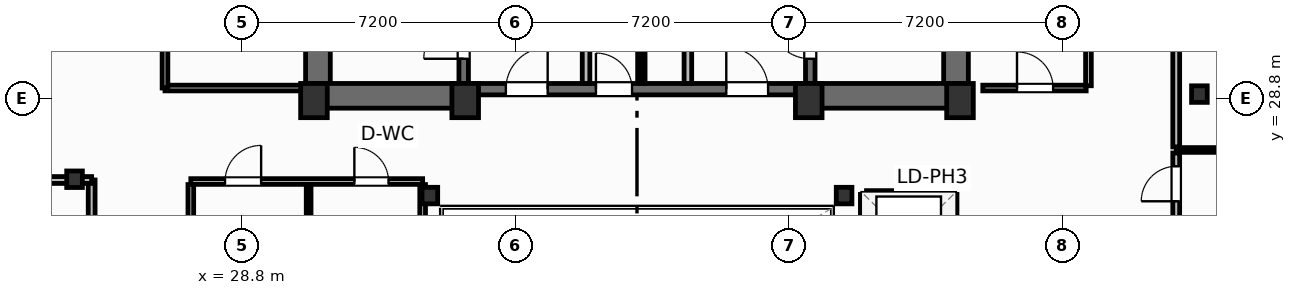
"""IFC4 building model, lengths in metres.
Left out: names, types, materials, properties, quantities, classifications, styles, units other than length and angle.
Written with IfcOpenShell. Run it as: python <this file> out.ifc"""

import sys

from ifc_helpers import new_model, si_unit, direction, frame, frame_2d, origin, origin_2d, place, context, subcontext, project, spatial, rectangle, i_section, extrude, element, fill, save


model = new_model("IFC4")
c1 = context("Model", 3, precision=1e-05, world=origin(), true_north=direction((0.0, 1.0)))
c2 = subcontext(c1, "Body", "Model", "MODEL_VIEW")
j1 = project(units=[si_unit("LENGTHUNIT", "METRE"), si_unit("PLANEANGLEUNIT", "RADIAN")], contexts=[c1])
p1 = place(None, origin())
s1 = spatial("IfcSite", under=j1, at=p1, CompositionType="ELEMENT")
p2 = place(p1, origin())
s2 = spatial("IfcBuilding", under=s1, at=p2, CompositionType="ELEMENT")
p3 = place(p2, frame((0.0, 0.0, 231.2)))
s3 = spatial("IfcBuildingStorey", under=s2, at=p3, CompositionType="ELEMENT", Elevation=231.2)
for number, where, z_axis, x_axis in (
    (1, (30.7, 28.75, 0.0), (0.0, 0.0, 1.0), (1.0, 0.0, 0.0)),
    (2, (34.68, 28.75, 0.0), (0.0, 0.0, 1.0), (1.0, 0.0, 0.0)),
    (3, (43.72, 28.75, 0.0), (0.0, 0.0, 1.0), (1.0, 0.0, 0.0)),
    (4, (47.7, 28.75, 0.0), (0.0, 0.0, 1.0), (1.0, 0.0, 0.0)),
):
    element("IfcColumn", number, at=place(p3, frame(where, z_axis=z_axis, x_axis=x_axis)), inside=s3, PredefinedType="COLUMN", context=c2, shape_type="SweptSolid", body=[
        extrude(rectangle(XDim=0.7, YDim=0.9, at=origin_2d()), origin(), (0.0, 0.0, 1.0), 3.7),
    ])
for number, where, z_axis, x_axis in (
    (5, (33.75, 26.25, 0.0), (0.0, 0.0, 1.0), (1.0, 0.0, 0.0)),
    (6, (44.65, 26.25, 0.0), (0.0, 0.0, 1.0), (1.0, 0.0, 0.0)),
    (7, (24.4, 26.68, 0.0), (0.0, 0.0, 1.0), (1.0, 0.0, 0.0)),
    (8, (54.0, 28.92, 0.0), (0.0, 0.0, 1.0), (1.0, 0.0, 0.0)),
):
    element("IfcColumn", number, at=place(p3, frame(where, z_axis=z_axis, x_axis=x_axis)), inside=s3, PredefinedType="COLUMN", context=c2, shape_type="SweptSolid", body=[
        extrude(i_section(OverallWidth=0.412, OverallDepth=0.435, WebThickness=0.036, FlangeThickness=0.057, FilletRadius=0.025, at=origin_2d()), origin(), (0.0, 0.0, 1.0), 3.7),
    ])
for number, where, z_axis, x_axis in (
    (9, (30.805, 29.2, 0.0), (0.0, 0.0, 1.0), (0.0, 1.0, 0.0)),
    (10, (47.595, 29.2, 0.0), (0.0, 0.0, 1.0), (0.0, 1.0, 0.0)),
):
    element("IfcWall", number, at=place(p3, frame(where, z_axis=z_axis, x_axis=x_axis)), inside=s3, PredefinedType="SHEAR", context=c2, shape_type="SweptSolid", body=[
        extrude(rectangle(XDim=9.22, YDim=0.65, at=frame_2d((4.61, 0.0))), origin(), (0.0, 0.0, 1.0), 3.45),
    ])
p4 = place(p3, frame((30.48, 28.875, 0.0), z_axis=(0.0, 0.0, 1.0), x_axis=(1.0, 0.0, 0.0)))
e11 = element("IfcWall", 11, at=p4, inside=s3, PredefinedType="SHEAR", context=c2, shape_type="SweptSolid", body=[
    extrude(rectangle(XDim=4.32, YDim=0.65, at=frame_2d((2.16, 0.0))), origin(), (0.0, 0.0, 1.0), 3.45),
])
p5 = place(p3, frame((43.6, 28.875, 0.0), z_axis=(0.0, 0.0, 1.0), x_axis=(1.0, 0.0, 0.0)))
e12 = element("IfcWall", 12, at=p5, inside=s3, PredefinedType="SHEAR", context=c2, shape_type="SweptSolid", body=[
    extrude(rectangle(XDim=4.32, YDim=0.65, at=frame_2d((2.16, 0.0))), origin(), (0.0, 0.0, 1.0), 3.45),
])
p6 = place(p3, frame((34.8, 29.05, 0.0), z_axis=(0.0, 0.0, 1.0), x_axis=(1.0, 0.0, 0.0)))
e13 = element("IfcWall", 13, at=p6, inside=s3, PredefinedType="SHEAR", context=c2, shape_type="SweptSolid", body=[
    extrude(rectangle(XDim=8.8, YDim=0.3, at=frame_2d((4.4, 0.0))), origin(), (0.0, 0.0, 1.0), 3.45),
])
p7 = place(p6, frame((0.95, 0.0, 0.0)))
e14 = element("IfcOpeningElement", 14, at=p7, cuts=e13, PredefinedType="OPENING", context=c2, shape_type="SweptSolid", body=[
    extrude(rectangle(XDim=1.1, YDim=2.15, at=frame_2d((0.55, 1.075))), frame((0.0, 0.16, 0.0), z_axis=(0.0, -1.0, 0.0), x_axis=(1.0, 0.0, 0.0)), (0.0, 0.0, 1.0), 0.32),
])
p8 = place(p6, frame((6.75, 0.0, 0.0)))
e15 = element("IfcOpeningElement", 15, at=p8, cuts=e13, PredefinedType="OPENING", context=c2, shape_type="SweptSolid", body=[
    extrude(rectangle(XDim=1.1, YDim=2.15, at=frame_2d((0.55, 1.075))), frame((0.0, 0.16, 0.0), z_axis=(0.0, -1.0, 0.0), x_axis=(1.0, 0.0, 0.0)), (0.0, 0.0, 1.0), 0.32),
])
p9 = place(p6, frame((3.32, 0.0, 0.0)))
e16 = element("IfcOpeningElement", 16, at=p9, cuts=e13, PredefinedType="OPENING", context=c2, shape_type="SweptSolid", body=[
    extrude(rectangle(XDim=0.95, YDim=2.15, at=frame_2d((0.475, 1.075))), frame((0.0, 0.16, 0.0), z_axis=(0.0, -1.0, 0.0), x_axis=(1.0, 0.0, 0.0)), (0.0, 0.0, 1.0), 0.32),
])
p10 = place(p3, frame((34.64, 29.2, 0.0), z_axis=(0.0, 0.0, 1.0), x_axis=(0.0, 1.0, 0.0)))
e17 = element("IfcWall", 17, at=p10, inside=s3, PredefinedType="SHEAR", context=c2, shape_type="SweptSolid", body=[
    extrude(rectangle(XDim=9.22, YDim=0.25, at=frame_2d((4.61, 0.0))), origin(), (0.0, 0.0, 1.0), 3.45),
])
p11 = place(p10, frame((0.65, 0.0, 0.0)))
e18 = element("IfcOpeningElement", 18, at=p11, cuts=e17, PredefinedType="OPENING", context=c2, shape_type="SweptSolid", body=[
    extrude(rectangle(XDim=1.05, YDim=2.15, at=frame_2d((0.525, 1.075))), frame((0.0, 0.135, 0.0), z_axis=(0.0, -1.0, 0.0), x_axis=(1.0, 0.0, 0.0)), (0.0, 0.0, 1.0), 0.27),
])
p12 = place(p3, frame((43.76, 29.2, 0.0), z_axis=(0.0, 0.0, 1.0), x_axis=(0.0, 1.0, 0.0)))
e19 = element("IfcWall", 19, at=p12, inside=s3, PredefinedType="SHEAR", context=c2, shape_type="SweptSolid", body=[
    extrude(rectangle(XDim=9.22, YDim=0.25, at=frame_2d((4.61, 0.0))), origin(), (0.0, 0.0, 1.0), 3.45),
])
p13 = place(p12, frame((0.65, 0.0, 0.0)))
e20 = element("IfcOpeningElement", 20, at=p13, cuts=e19, PredefinedType="OPENING", context=c2, shape_type="SweptSolid", body=[
    extrude(rectangle(XDim=1.05, YDim=2.15, at=frame_2d((0.525, 1.075))), frame((0.0, 0.135, 0.0), z_axis=(0.0, -1.0, 0.0), x_axis=(1.0, 0.0, 0.0)), (0.0, 0.0, 1.0), 0.27),
])
p14 = place(p3, frame((24.85, 19.24, 0.0), z_axis=(0.0, 0.0, 1.0), x_axis=(0.0, 1.0, 0.0)))
e21 = element("IfcWall", 21, at=p14, inside=s3, PredefinedType="PARTITIONING", context=c2, shape_type="SweptSolid", body=[
    extrude(rectangle(XDim=7.42, YDim=0.18, at=frame_2d((3.71, 0.0))), origin(), (0.0, 0.0, 1.0), 3.45),
])
p15 = place(p14, frame((2.4, 0.0, 0.0)))
e22 = element("IfcOpeningElement", 22, at=p15, cuts=e21, PredefinedType="OPENING", context=c2, shape_type="SweptSolid", body=[
    extrude(rectangle(XDim=0.92, YDim=2.05, at=frame_2d((0.46, 1.025))), frame((0.0, 0.1, 0.0), z_axis=(0.0, -1.0, 0.0), x_axis=(1.0, 0.0, 0.0)), (0.0, 0.0, 1.0), 0.2),
])
p16 = place(p3, frame((3.482, 26.66, 0.0), z_axis=(0.0, 0.0, 1.0), x_axis=(1.0, 0.0, 0.0)))
e23 = element("IfcWall", 23, at=p16, inside=s3, PredefinedType="PARTITIONING", context=c2, shape_type="SweptSolid", body=[
    extrude(rectangle(XDim=21.368, YDim=0.18, at=frame_2d((10.684, 0.0))), origin(), (0.0, 0.0, 1.0), 2.662),
])
p17 = place(p3, frame((53.39, 19.3, 0.0), z_axis=(0.0, 0.0, 1.0), x_axis=(0.0, 1.0, 0.0)))
e24 = element("IfcWall", 24, at=p17, inside=s3, PredefinedType="PARTITIONING", context=c2, shape_type="SweptSolid", body=[
    extrude(rectangle(XDim=8.07, YDim=0.18, at=frame_2d((4.035, 0.0))), origin(), (0.0, 0.0, 1.0), 3.45),
])
p18 = place(p17, frame((6.8, 0.0, 0.0)))
e25 = element("IfcOpeningElement", 25, at=p18, cuts=e24, PredefinedType="OPENING", context=c2, shape_type="SweptSolid", body=[
    extrude(rectangle(XDim=0.92, YDim=2.05, at=frame_2d((0.46, 1.025))), frame((0.0, 0.1, 0.0), z_axis=(0.0, -1.0, 0.0), x_axis=(1.0, 0.0, 0.0)), (0.0, 0.0, 1.0), 0.2),
])
p19 = place(p3, frame((53.39, 27.53, 0.0), z_axis=(0.0, 0.0, 1.0), x_axis=(0.0, 1.0, 0.0)))
e26 = element("IfcWall", 26, at=p19, inside=s3, PredefinedType="PARTITIONING", context=c2, shape_type="SweptSolid", body=[
    extrude(rectangle(XDim=11.67, YDim=0.18, at=frame_2d((5.835, 0.0))), origin(), (0.0, 0.0, 1.0), 3.45),
])
p20 = place(p19, frame((5.8, 0.0, 0.0)))
e27 = element("IfcOpeningElement", 27, at=p20, cuts=e26, PredefinedType="OPENING", context=c2, shape_type="SweptSolid", body=[
    extrude(rectangle(XDim=0.92, YDim=2.05, at=frame_2d((0.46, 1.025))), frame((0.0, 0.1, 0.0), z_axis=(0.0, -1.0, 0.0), x_axis=(1.0, 0.0, 0.0)), (0.0, 0.0, 1.0), 0.2),
])
p21 = place(p3, frame((53.39, 27.45, 0.0), z_axis=(0.0, 0.0, 1.0), x_axis=(1.0, 0.0, 0.0)))
e28 = element("IfcWall", 28, at=p21, inside=s3, PredefinedType="PARTITIONING", context=c2, shape_type="SweptSolid", body=[
    extrude(rectangle(XDim=20.199, YDim=0.125, at=frame_2d((10.1, 0.0))), origin(), (0.0, 0.0, 1.0), 2.739),
])
for number, where, z_axis, x_axis in (
    (29, (37.86, 29.2, 0.0), (0.0, 0.0, 1.0), (0.0, 1.0, 0.0)),
    (30, (40.54, 29.2, 0.0), (0.0, 0.0, 1.0), (0.0, 1.0, 0.0)),
):
    element("IfcWall", number, at=place(p3, frame(where, z_axis=z_axis, x_axis=x_axis)), inside=s3, PredefinedType="PARTITIONING", context=c2, shape_type="SweptSolid", body=[
        extrude(rectangle(XDim=5.18, YDim=0.2, at=frame_2d((2.59, 0.0))), origin(), (0.0, 0.0, 1.0), 3.45),
    ])
p22 = place(p3, frame((39.35, 29.2, 0.0), z_axis=(0.0, 0.0, 1.0), x_axis=(0.0, 1.0, 0.0)))
e31 = element("IfcWall", 31, at=p22, inside=s3, PredefinedType="PARTITIONING", context=c2, shape_type="SweptSolid", body=[
    extrude(rectangle(XDim=5.22, YDim=0.125, at=frame_2d((2.61, 0.0))), origin(), (0.0, 0.0, 1.0), 3.45),
])
p23 = place(p22, frame((2.05, 0.0, 0.0)))
e32 = element("IfcOpeningElement", 32, at=p23, cuts=e31, PredefinedType="OPENING", context=c2, shape_type="SweptSolid", body=[
    extrude(rectangle(XDim=0.85, YDim=2.05, at=frame_2d((0.425, 1.025))), frame((0.0, 0.073, 0.0), z_axis=(0.0, -1.0, 0.0), x_axis=(1.0, 0.0, 0.0)), (0.0, 0.0, 1.0), 0.145),
])
p24 = place(p3, frame((27.46, 26.62, 0.0), z_axis=(0.0, 0.0, 1.0), x_axis=(1.0, 0.0, 0.0)))
e33 = element("IfcWall", 33, at=p24, inside=s3, PredefinedType="PARTITIONING", context=c2, shape_type="SweptSolid", body=[
    extrude(rectangle(XDim=6.1, YDim=0.15, at=frame_2d((3.05, 0.0))), origin(), (0.0, 0.0, 1.0), 2.662),
])
p25 = place(p24, frame((0.9, 0.0, 0.0)))
e34 = element("IfcOpeningElement", 34, at=p25, cuts=e33, PredefinedType="OPENING", context=c2, shape_type="SweptSolid", body=[
    extrude(rectangle(XDim=0.95, YDim=2.05, at=frame_2d((0.475, 1.025))), frame((0.0, 0.085, 0.0), z_axis=(0.0, -1.0, 0.0), x_axis=(1.0, 0.0, 0.0)), (0.0, 0.0, 1.0), 0.17),
])
p26 = place(p24, frame((4.303, 0.0, 0.0)))
e35 = element("IfcOpeningElement", 35, at=p26, cuts=e33, PredefinedType="OPENING", context=c2, shape_type="SweptSolid", body=[
    extrude(rectangle(XDim=0.9, YDim=2.05, at=frame_2d((0.45, 1.025))), frame((0.0, 0.085, 0.0), z_axis=(0.0, -1.0, 0.0), x_axis=(1.0, 0.0, 0.0)), (0.0, 0.0, 1.0), 0.17),
])
p27 = place(p3, frame((30.56, 19.38, 0.0), z_axis=(0.0, 0.0, 1.0), x_axis=(0.0, 1.0, 0.0)))
e36 = element("IfcWall", 36, at=p27, inside=s3, PredefinedType="PARTITIONING", context=c2, shape_type="SweptSolid", body=[
    extrude(rectangle(XDim=7.16, YDim=0.125, at=frame_2d((3.58, 0.0))), origin(), (0.0, 0.0, 1.0), 3.45),
])
p28 = place(p27, frame((1.4, 0.0, 0.0)))
e37 = element("IfcOpeningElement", 37, at=p28, cuts=e36, PredefinedType="OPENING", context=c2, shape_type="SweptSolid", body=[
    extrude(rectangle(XDim=0.92, YDim=2.05, at=frame_2d((0.46, 1.025))), frame((0.0, 0.073, 0.0), z_axis=(0.0, -1.0, 0.0), x_axis=(1.0, 0.0, 0.0)), (0.0, 0.0, 1.0), 0.145),
])
p29 = place(p3, frame((27.46, 19.38, 0.0), z_axis=(0.0, 0.0, 1.0), x_axis=(0.0, 1.0, 0.0)))
e38 = element("IfcWall", 38, at=p29, inside=s3, PredefinedType="PARTITIONING", context=c2, shape_type="SweptSolid", body=[
    extrude(rectangle(XDim=7.16, YDim=0.15, at=frame_2d((3.58, 0.0))), origin(), (0.0, 0.0, 1.0), 3.45),
])
p30 = place(p3, frame((33.56, 19.38, 0.0), z_axis=(0.0, 0.0, 1.0), x_axis=(0.0, 1.0, 0.0)))
e39 = element("IfcWall", 39, at=p30, inside=s3, PredefinedType="PARTITIONING", context=c2, shape_type="SweptSolid", body=[
    extrude(rectangle(XDim=7.16, YDim=0.15, at=frame_2d((3.58, 0.0))), origin(), (0.0, 0.0, 1.0), 2.824),
])
p31 = place(p3, frame((26.78, 29.08, 0.0), z_axis=(0.0, 0.0, 1.0), x_axis=(1.0, 0.0, 0.0)))
e40 = element("IfcWall", 40, at=p31, inside=s3, PredefinedType="PARTITIONING", context=c2, shape_type="SweptSolid", body=[
    extrude(rectangle(XDim=3.7, YDim=0.15, at=frame_2d((1.85, 0.0))), origin(), (0.0, 0.0, 1.0), 3.45),
])
p32 = place(p3, frame((26.78, 29.08, 0.0), z_axis=(0.0, 0.0, 1.0), x_axis=(0.0, 1.0, 0.0)))
e41 = element("IfcWall", 41, at=p32, inside=s3, PredefinedType="PARTITIONING", context=c2, shape_type="SweptSolid", body=[
    extrude(rectangle(XDim=9.18, YDim=0.15, at=frame_2d((4.59, 0.0))), origin(), (0.0, 0.0, 1.0), 3.45),
])
p33 = place(p32, frame((2.4, 0.0, 0.0)))
e42 = element("IfcOpeningElement", 42, at=p33, cuts=e41, PredefinedType="OPENING", context=c2, shape_type="SweptSolid", body=[
    extrude(rectangle(XDim=0.95, YDim=2.05, at=frame_2d((0.475, 1.025))), frame((0.0, 0.085, 0.0), z_axis=(0.0, -1.0, 0.0), x_axis=(1.0, 0.0, 0.0)), (0.0, 0.0, 1.0), 0.17),
])
p34 = place(p3, frame((48.3, 29.08, 0.0), z_axis=(0.0, 0.0, 1.0), x_axis=(1.0, 0.0, 0.0)))
e43 = element("IfcWall", 43, at=p34, inside=s3, PredefinedType="PARTITIONING", context=c2, shape_type="SweptSolid", body=[
    extrude(rectangle(XDim=2.72, YDim=0.15, at=frame_2d((1.36, 0.0))), origin(), (0.0, 0.0, 1.0), 2.662),
])
p35 = place(p34, frame((0.9, 0.0, 0.0)))
e44 = element("IfcOpeningElement", 44, at=p35, cuts=e43, PredefinedType="OPENING", context=c2, shape_type="SweptSolid", body=[
    extrude(rectangle(XDim=0.95, YDim=2.05, at=frame_2d((0.475, 1.025))), frame((0.0, 0.085, 0.0), z_axis=(0.0, -1.0, 0.0), x_axis=(1.0, 0.0, 0.0)), (0.0, 0.0, 1.0), 0.17),
])
p36 = place(p3, frame((51.08, 29.14, 0.0), z_axis=(0.0, 0.0, 1.0), x_axis=(0.0, 1.0, 0.0)))
e45 = element("IfcWall", 45, at=p36, inside=s3, PredefinedType="PARTITIONING", context=c2, shape_type="SweptSolid", body=[
    extrude(rectangle(XDim=6.76, YDim=0.15, at=frame_2d((3.38, 0.0))), origin(), (0.0, 0.0, 1.0), 3.45),
])
p37 = place(p3, frame((45.24, 26.28, 0.0), z_axis=(0.0, 0.0, 1.0), x_axis=(1.0, 0.0, 0.0)))
e46 = element("IfcWall", 46, at=p37, inside=s3, PredefinedType="PARTITIONING", context=c2, shape_type="SweptSolid", body=[
    extrude(rectangle(XDim=2.22, YDim=0.2, at=frame_2d((1.11, 0.0))), origin(), (0.0, 0.0, 1.0), 3.45),
])
p38 = place(p3, frame((45.18, 19.38, 0.0), z_axis=(0.0, 0.0, 1.0), x_axis=(0.0, 1.0, 0.0)))
e47 = element("IfcWall", 47, at=p38, inside=s3, PredefinedType="PARTITIONING", context=c2, shape_type="SweptSolid", body=[
    extrude(rectangle(XDim=6.9, YDim=0.2, at=frame_2d((3.45, 0.0))), origin(), (0.0, 0.0, 1.0), 3.45),
])
p39 = place(p3, frame((47.52, 19.38, 0.0), z_axis=(0.0, 0.0, 1.0), x_axis=(0.0, 1.0, 0.0)))
e48 = element("IfcWall", 48, at=p39, inside=s3, PredefinedType="PARTITIONING", context=c2, shape_type="SweptSolid", body=[
    extrude(rectangle(XDim=6.9, YDim=0.2, at=frame_2d((3.45, 0.0))), origin(), (0.0, 0.0, 1.0), 3.45),
])
p40 = place(p39, frame((0.59, 0.0, 0.0)))
e49 = element("IfcOpeningElement", 49, at=p40, cuts=e48, PredefinedType="OPENING", context=c2, shape_type="SweptSolid", body=[
    extrude(rectangle(XDim=1.1, YDim=2.15, at=frame_2d((0.55, 1.075))), frame((0.0, 0.11, 0.0), z_axis=(0.0, -1.0, 0.0), x_axis=(1.0, 0.0, 0.0)), (0.0, 0.0, 1.0), 0.22),
])
p41 = place(p39, frame((2.89, 0.0, 0.0)))
e50 = element("IfcOpeningElement", 50, at=p41, cuts=e48, PredefinedType="OPENING", context=c2, shape_type="SweptSolid", body=[
    extrude(rectangle(XDim=1.1, YDim=2.15, at=frame_2d((0.55, 1.075))), frame((0.0, 0.11, 0.0), z_axis=(0.0, -1.0, 0.0), x_axis=(1.0, 0.0, 0.0)), (0.0, 0.0, 1.0), 0.22),
])
p42 = place(p39, frame((5.19, 0.0, 0.0)))
e51 = element("IfcOpeningElement", 51, at=p42, cuts=e48, PredefinedType="OPENING", context=c2, shape_type="SweptSolid", body=[
    extrude(rectangle(XDim=1.1, YDim=2.15, at=frame_2d((0.55, 1.075))), frame((0.0, 0.11, 0.0), z_axis=(0.0, -1.0, 0.0), x_axis=(1.0, 0.0, 0.0)), (0.0, 0.0, 1.0), 0.22),
])
p43 = place(p18, origin())
e52 = element("IfcDoor", 52, at=p43, inside=s3, OperationType="SINGLE_SWING_LEFT", PredefinedType="DOOR", context=c2, shape_type="SweptSolid", body=[
    extrude(rectangle(XDim=0.92, YDim=2.05, at=frame_2d((0.46, 1.025))), frame((0.0, 0.025, 0.0), z_axis=(0.0, -1.0, 0.0), x_axis=(1.0, 0.0, 0.0)), (0.0, 0.0, 1.0), 0.05),
])
fill(e25, e52)
p44 = place(p11, origin())
e53 = element("IfcDoor", 53, at=p44, inside=s3, OperationType="SINGLE_SWING_LEFT", PredefinedType="DOOR", context=c2, shape_type="SweptSolid", body=[
    extrude(rectangle(XDim=1.05, YDim=2.15, at=frame_2d((0.525, 1.075))), frame((0.0, 0.025, 0.0), z_axis=(0.0, -1.0, 0.0), x_axis=(1.0, 0.0, 0.0)), (0.0, 0.0, 1.0), 0.05),
])
fill(e18, e53)
p45 = place(p13, origin())
e54 = element("IfcDoor", 54, at=p45, inside=s3, OperationType="SINGLE_SWING_RIGHT", PredefinedType="DOOR", context=c2, shape_type="SweptSolid", body=[
    extrude(rectangle(XDim=1.05, YDim=2.15, at=frame_2d((0.525, 1.075))), frame((0.0, 0.025, 0.0), z_axis=(0.0, -1.0, 0.0), x_axis=(1.0, 0.0, 0.0)), (0.0, 0.0, 1.0), 0.05),
])
fill(e20, e54)
p46 = place(p7, origin())
e55 = element("IfcDoor", 55, at=p46, inside=s3, OperationType="SINGLE_SWING_RIGHT", PredefinedType="DOOR", context=c2, shape_type="SweptSolid", body=[
    extrude(rectangle(XDim=1.1, YDim=2.15, at=frame_2d((0.55, 1.075))), frame((0.0, 0.025, 0.0), z_axis=(0.0, -1.0, 0.0), x_axis=(1.0, 0.0, 0.0)), (0.0, 0.0, 1.0), 0.05),
])
fill(e14, e55)
p47 = place(p8, origin())
e56 = element("IfcDoor", 56, at=p47, inside=s3, OperationType="SINGLE_SWING_LEFT", PredefinedType="DOOR", context=c2, shape_type="SweptSolid", body=[
    extrude(rectangle(XDim=1.1, YDim=2.15, at=frame_2d((0.55, 1.075))), frame((0.0, 0.025, 0.0), z_axis=(0.0, -1.0, 0.0), x_axis=(1.0, 0.0, 0.0)), (0.0, 0.0, 1.0), 0.05),
])
fill(e15, e56)
p48 = place(p9, origin())
e57 = element("IfcDoor", 57, at=p48, inside=s3, OperationType="SINGLE_SWING_LEFT", PredefinedType="DOOR", context=c2, shape_type="SweptSolid", body=[
    extrude(rectangle(XDim=0.95, YDim=2.15, at=frame_2d((0.475, 1.075))), frame((0.0, 0.025, 0.0), z_axis=(0.0, -1.0, 0.0), x_axis=(1.0, 0.0, 0.0)), (0.0, 0.0, 1.0), 0.05),
])
fill(e16, e57)
p49 = place(p25, origin())
e58 = element("IfcDoor", 58, at=p49, inside=s3, OperationType="SINGLE_SWING_RIGHT", PredefinedType="DOOR", context=c2, shape_type="SweptSolid", body=[
    extrude(rectangle(XDim=0.95, YDim=2.05, at=frame_2d((0.475, 1.025))), frame((0.0, 0.025, 0.0), z_axis=(0.0, -1.0, 0.0), x_axis=(1.0, 0.0, 0.0)), (0.0, 0.0, 1.0), 0.05),
])
fill(e34, e58)
p50 = place(p26, origin())
e59 = element("IfcDoor", 59, at=p50, inside=s3, OperationType="SINGLE_SWING_LEFT", PredefinedType="DOOR", context=c2, shape_type="SweptSolid", body=[
    extrude(rectangle(XDim=0.9, YDim=2.05, at=frame_2d((0.45, 1.025))), frame((0.0, 0.025, 0.0), z_axis=(0.0, -1.0, 0.0), x_axis=(1.0, 0.0, 0.0)), (0.0, 0.0, 1.0), 0.05),
])
fill(e35, e59)
p51 = place(p35, origin())
e60 = element("IfcDoor", 60, at=p51, inside=s3, OperationType="SINGLE_SWING_LEFT", PredefinedType="DOOR", context=c2, shape_type="SweptSolid", body=[
    extrude(rectangle(XDim=0.95, YDim=2.05, at=frame_2d((0.475, 1.025))), frame((0.0, 0.025, 0.0), z_axis=(0.0, -1.0, 0.0), x_axis=(1.0, 0.0, 0.0)), (0.0, 0.0, 1.0), 0.05),
])
fill(e44, e60)
save(model, sys.argv[1])
